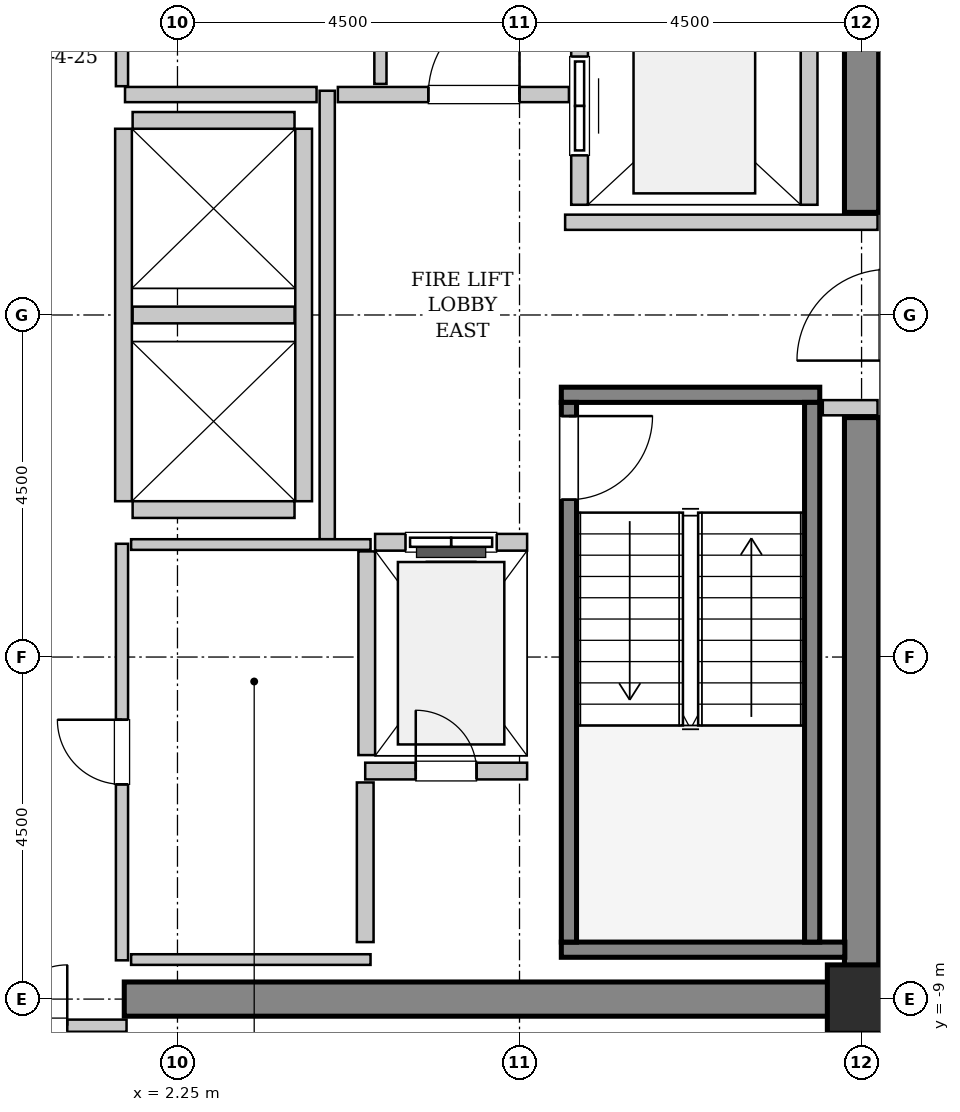
"""IFC4 building model, lengths in metres.
Left out: names, types, materials, properties, quantities, classifications, styles, units other than length and angle.
Written with IfcOpenShell. Run it as: python <this file> out.ifc"""

import sys

from ifc_helpers import new_model, si_unit, direction, frame, frame_2d, origin, origin_2d, place, context, subcontext, project, spatial, rectangle, extrude, source, transform, mapped, element, fill, save


model = new_model("IFC4")
c1 = context("Model", 3, precision=1e-05, world=origin(), true_north=direction((0.0, 1.0)))
c2 = subcontext(c1, "Body", "Model", "MODEL_VIEW")
j1 = project(units=[si_unit("LENGTHUNIT", "METRE"), si_unit("PLANEANGLEUNIT", "RADIAN")], contexts=[c1])
p1 = place(None, origin())
s1 = spatial("IfcSite", under=j1, at=p1, CompositionType="ELEMENT")
p2 = place(p1, origin())
s2 = spatial("IfcBuilding", under=s1, at=p2, CompositionType="ELEMENT")
p3 = place(p2, frame((0.0, 0.0, 302.6)))
s3 = spatial("IfcBuildingStorey", under=s2, at=p3, CompositionType="ELEMENT", Elevation=302.6)
m1 = source(origin(), c2, "Body", "SweptSolid", [
    extrude(rectangle(XDim=9.925, YDim=0.45, at=frame_2d((4.962, 0.0))), origin(), (0.0, 0.0, 1.0), 3.8),
])
p4 = place(p3, frame((1.55, -9.0, 0.0), z_axis=(0.0, 0.0, 1.0), x_axis=(1.0, 0.0, 0.0)))
e1 = element("IfcWall", 1, at=p4, inside=s3, PredefinedType="SHEAR", context=c2, shape_type="MappedRepresentation", body=[
    mapped(m1, transform((0.0, 0.0, 0.0), x_axis=(1.0, 0.0, 0.0), y_axis=(0.0, 1.0, 0.0), z_axis=(0.0, 0.0, 1.0), scale=1.0)),
])
m2 = source(origin(), c2, "Body", "SweptSolid", [
    extrude(rectangle(XDim=7.425, YDim=0.45, at=frame_2d((3.712, 0.0))), origin(), (0.0, 0.0, 1.0), 3.8),
])
for number, where, z_axis, x_axis in (
    (2, (11.25, -8.775, 0.0), (0.0, 0.0, 1.0), (0.0, 1.0, 0.0)),
    (3, (11.25, 1.35, 0.0), (0.0, 0.0, 1.0), (0.0, 1.0, 0.0)),
):
    element("IfcWall", number, at=place(p3, frame(where, z_axis=z_axis, x_axis=x_axis)), inside=s3, PredefinedType="SHEAR", context=c2, shape_type="MappedRepresentation", body=[
        mapped(m2, transform((0.0, 0.0, 0.0), x_axis=(1.0, 0.0, 0.0), y_axis=(0.0, 1.0, 0.0), z_axis=(0.0, 0.0, 1.0), scale=1.0)),
    ])
m3 = source(origin(), c2, "Body", "SweptSolid", [
    extrude(rectangle(XDim=0.9, YDim=0.9, at=origin_2d()), origin(), (0.0, 0.0, 1.0), 3.8),
])
p5 = place(p3, frame((11.25, -9.0, 0.0), z_axis=(0.0, 0.0, 1.0), x_axis=(1.0, 0.0, 0.0)))
e4 = element("IfcColumn", 4, at=p5, inside=s3, PredefinedType="COLUMN", context=c2, shape_type="MappedRepresentation", body=[
    mapped(m3, transform((0.0, 0.0, 0.0), x_axis=(1.0, 0.0, 0.0), y_axis=(0.0, 1.0, 0.0), z_axis=(0.0, 0.0, 1.0), scale=1.0)),
])
m4 = source(origin(), c2, "Body", "SweptSolid", [
    extrude(rectangle(XDim=3.4, YDim=0.2, at=frame_2d((1.7, 0.0))), origin(), (0.0, 0.0, 1.0), 3.8),
])
p6 = place(p3, frame((7.3, -1.05, 0.0), z_axis=(0.0, 0.0, 1.0), x_axis=(1.0, 0.0, 0.0)))
e5 = element("IfcWall", 5, at=p6, inside=s3, PredefinedType="SOLIDWALL", context=c2, shape_type="MappedRepresentation", body=[
    mapped(m4, transform((0.0, 0.0, 0.0), x_axis=(1.0, 0.0, 0.0), y_axis=(0.0, 1.0, 0.0), z_axis=(0.0, 0.0, 1.0), scale=1.0)),
])
m5 = source(origin(), c2, "Body", "SweptSolid", [
    extrude(rectangle(XDim=3.73, YDim=0.2, at=frame_2d((1.865, 0.0))), origin(), (0.0, 0.0, 1.0), 3.8),
])
p7 = place(p3, frame((7.3, -8.35, 0.0), z_axis=(0.0, 0.0, 1.0), x_axis=(1.0, 0.0, 0.0)))
e6 = element("IfcWall", 6, at=p7, inside=s3, PredefinedType="SOLIDWALL", context=c2, shape_type="MappedRepresentation", body=[
    mapped(m5, transform((0.0, 0.0, 0.0), x_axis=(1.0, 0.0, 0.0), y_axis=(0.0, 1.0, 0.0), z_axis=(0.0, 0.0, 1.0), scale=1.0)),
])
m6 = source(origin(), c2, "Body", "SweptSolid", [
    extrude(rectangle(XDim=7.1, YDim=0.2, at=frame_2d((3.55, 0.0))), origin(), (0.0, 0.0, 1.0), 3.8),
])
p8 = place(p3, frame((7.4, -1.15, 0.0), z_axis=(0.0, 0.0, 1.0), x_axis=(0.0, -1.0, 0.0)))
e7 = element("IfcWall", 7, at=p8, inside=s3, PredefinedType="SOLIDWALL", context=c2, shape_type="MappedRepresentation", body=[
    mapped(m6, transform((0.0, 0.0, 0.0), x_axis=(1.0, 0.0, 0.0), y_axis=(0.0, 1.0, 0.0), z_axis=(0.0, 0.0, 1.0), scale=1.0)),
])
p9 = place(p8, frame((0.18, 0.0, 0.0)))
e8 = element("IfcOpeningElement", 8, at=p9, cuts=e7, PredefinedType="OPENING", context=c2, shape_type="SweptSolid", body=[
    extrude(rectangle(XDim=1.1, YDim=2.15, at=frame_2d((0.55, 1.075))), frame((0.0, 0.11, 0.0), z_axis=(0.0, -1.0, 0.0), x_axis=(1.0, 0.0, 0.0)), (0.0, 0.0, 1.0), 0.22),
])
p10 = place(p3, frame((10.6, -1.15, 0.0), z_axis=(0.0, 0.0, 1.0), x_axis=(0.0, -1.0, 0.0)))
e9 = element("IfcWall", 9, at=p10, inside=s3, PredefinedType="SOLIDWALL", context=c2, shape_type="MappedRepresentation", body=[
    mapped(m6, transform((0.0, 0.0, 0.0), x_axis=(1.0, 0.0, 0.0), y_axis=(0.0, 1.0, 0.0), z_axis=(0.0, 0.0, 1.0), scale=1.0)),
])
m7 = source(origin(), c2, "Body", "SweptSolid", [
    extrude(rectangle(XDim=2.0, YDim=0.22, at=frame_2d((1.0, 0.0))), origin(), (0.0, 0.0, 1.0), 3.535),
])
p11 = place(p3, frame((6.85, -2.99, 0.0), z_axis=(0.0, 0.0, 1.0), x_axis=(-1.0, 0.0, 0.0)))
e10 = element("IfcWall", 10, at=p11, inside=s3, PredefinedType="SOLIDWALL", context=c2, shape_type="MappedRepresentation", body=[
    mapped(m7, transform((0.0, 0.0, 0.0), x_axis=(1.0, 0.0, 0.0), y_axis=(0.0, 1.0, 0.0), z_axis=(0.0, 0.0, 1.0), scale=1.0)),
])
p12 = place(p11, frame((0.4, 0.0, 0.0)))
e11 = element("IfcOpeningElement", 11, at=p12, cuts=e10, PredefinedType="OPENING", context=c2, shape_type="SweptSolid", body=[
    extrude(rectangle(XDim=1.2, YDim=2.2, at=frame_2d((0.6, 1.1))), frame((0.0, 0.12, 0.0), z_axis=(0.0, -1.0, 0.0), x_axis=(1.0, 0.0, 0.0)), (0.0, 0.0, 1.0), 0.24),
])
m8 = source(origin(), c2, "Body", "SweptSolid", [
    extrude(rectangle(XDim=2.68, YDim=0.22, at=frame_2d((1.34, 0.0))), origin(), (0.0, 0.0, 1.0), 3.535),
])
p13 = place(p3, frame((4.74, -3.11, 0.0), z_axis=(0.0, 0.0, 1.0), x_axis=(0.0, -1.0, 0.0)))
e12 = element("IfcWall", 12, at=p13, inside=s3, PredefinedType="SOLIDWALL", context=c2, shape_type="MappedRepresentation", body=[
    mapped(m8, transform((0.0, 0.0, 0.0), x_axis=(1.0, 0.0, 0.0), y_axis=(0.0, 1.0, 0.0), z_axis=(0.0, 0.0, 1.0), scale=1.0)),
])
m9 = source(origin(), c2, "Body", "SweptSolid", [
    extrude(rectangle(XDim=5.45, YDim=0.22, at=frame_2d((2.725, 0.0))), origin(), (0.0, 0.0, 1.0), 3.535),
])
p14 = place(p3, frame((7.54, 6.9, 0.0), z_axis=(0.0, 0.0, 1.0), x_axis=(0.0, -1.0, 0.0)))
e13 = element("IfcWall", 13, at=p14, inside=s3, PredefinedType="SOLIDWALL", context=c2, shape_type="MappedRepresentation", body=[
    mapped(m9, transform((0.0, 0.0, 0.0), x_axis=(1.0, 0.0, 0.0), y_axis=(0.0, 1.0, 0.0), z_axis=(0.0, 0.0, 1.0), scale=1.0)),
])
p15 = place(p14, frame((3.5, 0.0, 0.0)))
e14 = element("IfcOpeningElement", 14, at=p15, cuts=e13, PredefinedType="OPENING", context=c2, shape_type="SweptSolid", body=[
    extrude(rectangle(XDim=1.3, YDim=2.3, at=frame_2d((0.65, 1.15))), frame((0.0, 0.12, 0.0), z_axis=(0.0, -1.0, 0.0), x_axis=(1.0, 0.0, 0.0)), (0.0, 0.0, 1.0), 0.24),
])
p16 = place(p14, frame((0.65, 0.0, 0.0)))
e15 = element("IfcOpeningElement", 15, at=p16, cuts=e13, PredefinedType="OPENING", context=c2, shape_type="SweptSolid", body=[
    extrude(rectangle(XDim=1.3, YDim=2.3, at=frame_2d((0.65, 1.15))), frame((0.0, 0.12, 0.0), z_axis=(0.0, -1.0, 0.0), x_axis=(1.0, 0.0, 0.0)), (0.0, 0.0, 1.0), 0.24),
])
p17 = place(p3, frame((10.56, 1.45, 0.0), z_axis=(0.0, 0.0, 1.0), x_axis=(0.0, 1.0, 0.0)))
e16 = element("IfcWall", 16, at=p17, inside=s3, PredefinedType="SOLIDWALL", context=c2, shape_type="MappedRepresentation", body=[
    mapped(m9, transform((0.0, 0.0, 0.0), x_axis=(1.0, 0.0, 0.0), y_axis=(0.0, 1.0, 0.0), z_axis=(0.0, 0.0, 1.0), scale=1.0)),
])
m10 = source(origin(), c2, "Body", "SweptSolid", [
    extrude(rectangle(XDim=4.9, YDim=0.22, at=frame_2d((2.45, 0.0))), origin(), (0.0, 0.0, 1.0), 3.535),
])
for number, where, z_axis, x_axis in (
    (17, (1.54, 2.45, 0.0), (0.0, 0.0, 1.0), (0.0, -1.0, 0.0)),
    (18, (3.91, -2.45, 0.0), (0.0, 0.0, 1.0), (0.0, 1.0, 0.0)),
):
    element("IfcWall", number, at=place(p3, frame(where, z_axis=z_axis, x_axis=x_axis)), inside=s3, PredefinedType="SOLIDWALL", context=c2, shape_type="MappedRepresentation", body=[
        mapped(m10, transform((0.0, 0.0, 0.0), x_axis=(1.0, 0.0, 0.0), y_axis=(0.0, 1.0, 0.0), z_axis=(0.0, 0.0, 1.0), scale=1.0)),
    ])
m11 = source(origin(), c2, "Body", "SweptSolid", [
    extrude(rectangle(XDim=2.13, YDim=0.22, at=frame_2d((1.065, 0.0))), origin(), (0.0, 0.0, 1.0), 3.535),
])
for number, where, z_axis, x_axis in (
    (19, (1.66, -2.56, 0.0), (0.0, 0.0, 1.0), (1.0, 0.0, 0.0)),
    (20, (1.66, 0.0, 0.0), (0.0, 0.0, 1.0), (1.0, 0.0, 0.0)),
    (21, (3.79, 2.56, 0.0), (0.0, 0.0, 1.0), (-1.0, 0.0, 0.0)),
):
    element("IfcWall", number, at=place(p3, frame(where, z_axis=z_axis, x_axis=x_axis)), inside=s3, PredefinedType="SOLIDWALL", context=c2, shape_type="MappedRepresentation", body=[
        mapped(m11, transform((0.0, 0.0, 0.0), x_axis=(1.0, 0.0, 0.0), y_axis=(0.0, 1.0, 0.0), z_axis=(0.0, 0.0, 1.0), scale=1.0)),
    ])
p18 = place(p3, frame((4.72, -6.0, 0.0), z_axis=(0.0, 0.0, 1.0), x_axis=(1.0, 0.0, 0.0)))
e22 = element("IfcWall", 22, at=p18, inside=s3, PredefinedType="SOLIDWALL", context=c2, shape_type="MappedRepresentation", body=[
    mapped(m11, transform((0.0, 0.0, 0.0), x_axis=(1.0, 0.0, 0.0), y_axis=(0.0, 1.0, 0.0), z_axis=(0.0, 0.0, 1.0), scale=1.0)),
])
p19 = place(p18, frame((0.665, 0.0, 0.0)))
e23 = element("IfcOpeningElement", 23, at=p19, cuts=e22, PredefinedType="OPENING", context=c2, shape_type="SweptSolid", body=[
    extrude(rectangle(XDim=0.8, YDim=2.0, at=frame_2d((0.4, 1.0))), frame((0.0, 0.12, 0.0), z_axis=(0.0, -1.0, 0.0), x_axis=(1.0, 0.0, 0.0)), (0.0, 0.0, 1.0), 0.24),
])
m12 = source(origin(), c2, "Body", "SweptSolid", [
    extrude(rectangle(XDim=2.1, YDim=0.22, at=frame_2d((1.05, 0.0))), origin(), (0.0, 0.0, 1.0), 3.535),
])
p20 = place(p3, frame((4.72, -8.25, 0.0), z_axis=(0.0, 0.0, 1.0), x_axis=(0.0, 1.0, 0.0)))
e24 = element("IfcWall", 24, at=p20, inside=s3, PredefinedType="SOLIDWALL", context=c2, shape_type="MappedRepresentation", body=[
    mapped(m12, transform((0.0, 0.0, 0.0), x_axis=(1.0, 0.0, 0.0), y_axis=(0.0, 1.0, 0.0), z_axis=(0.0, 0.0, 1.0), scale=1.0)),
])
m13 = source(origin(), c2, "Body", "SweptSolid", [
    extrude(rectangle(XDim=5.9, YDim=0.2, at=frame_2d((2.95, 0.0))), origin(), (0.0, 0.0, 1.0), 3.535),
])
p21 = place(p3, frame((4.22, -2.95, 0.0), z_axis=(0.0, 0.0, 1.0), x_axis=(0.0, 1.0, 0.0)))
e25 = element("IfcWall", 25, at=p21, inside=s3, PredefinedType="PARTITIONING", context=c2, shape_type="MappedRepresentation", body=[
    mapped(m13, transform((0.0, 0.0, 0.0), x_axis=(1.0, 0.0, 0.0), y_axis=(0.0, 1.0, 0.0), z_axis=(0.0, 0.0, 1.0), scale=1.0)),
])
m14 = source(origin(), c2, "Body", "SweptSolid", [
    extrude(rectangle(XDim=2.52, YDim=0.2, at=frame_2d((1.26, 0.0))), origin(), (0.0, 0.0, 1.0), 3.535),
])
p22 = place(p3, frame((1.56, 2.9, 0.0), z_axis=(0.0, 0.0, 1.0), x_axis=(1.0, 0.0, 0.0)))
e26 = element("IfcWall", 26, at=p22, inside=s3, PredefinedType="PARTITIONING", context=c2, shape_type="MappedRepresentation", body=[
    mapped(m14, transform((0.0, 0.0, 0.0), x_axis=(1.0, 0.0, 0.0), y_axis=(0.0, 1.0, 0.0), z_axis=(0.0, 0.0, 1.0), scale=1.0)),
])
m15 = source(origin(), c2, "Body", "SweptSolid", [
    extrude(rectangle(XDim=3.04, YDim=0.2, at=frame_2d((1.52, 0.0))), origin(), (0.0, 0.0, 1.0), 3.535),
])
p23 = place(p3, frame((4.36, 2.9, 0.0), z_axis=(0.0, 0.0, 1.0), x_axis=(1.0, 0.0, 0.0)))
e27 = element("IfcWall", 27, at=p23, inside=s3, PredefinedType="PARTITIONING", context=c2, shape_type="MappedRepresentation", body=[
    mapped(m15, transform((0.0, 0.0, 0.0), x_axis=(1.0, 0.0, 0.0), y_axis=(0.0, 1.0, 0.0), z_axis=(0.0, 0.0, 1.0), scale=1.0)),
])
p24 = place(p23, frame((1.19, 0.0, 0.0)))
e28 = element("IfcOpeningElement", 28, at=p24, cuts=e27, PredefinedType="OPENING", context=c2, shape_type="SweptSolid", body=[
    extrude(rectangle(XDim=1.2, YDim=2.15, at=frame_2d((0.6, 1.075))), frame((0.0, 0.11, 0.0), z_axis=(0.0, -1.0, 0.0), x_axis=(1.0, 0.0, 0.0)), (0.0, 0.0, 1.0), 0.22),
])
m16 = source(origin(), c2, "Body", "SweptSolid", [
    extrude(rectangle(XDim=4.11, YDim=0.2, at=frame_2d((2.055, 0.0))), origin(), (0.0, 0.0, 1.0), 3.535),
])
p25 = place(p3, frame((7.35, 1.22, 0.0), z_axis=(0.0, 0.0, 1.0), x_axis=(1.0, 0.0, 0.0)))
e29 = element("IfcWall", 29, at=p25, inside=s3, PredefinedType="PARTITIONING", context=c2, shape_type="MappedRepresentation", body=[
    mapped(m16, transform((0.0, 0.0, 0.0), x_axis=(1.0, 0.0, 0.0), y_axis=(0.0, 1.0, 0.0), z_axis=(0.0, 0.0, 1.0), scale=1.0)),
])
m17 = source(origin(), c2, "Body", "SweptSolid", [
    extrude(rectangle(XDim=0.72, YDim=0.2, at=frame_2d((0.36, 0.0))), origin(), (0.0, 0.0, 1.0), 3.535),
])
p26 = place(p3, frame((10.74, -1.22, 0.0), z_axis=(0.0, 0.0, 1.0), x_axis=(1.0, 0.0, 0.0)))
e30 = element("IfcWall", 30, at=p26, inside=s3, PredefinedType="PARTITIONING", context=c2, shape_type="MappedRepresentation", body=[
    mapped(m17, transform((0.0, 0.0, 0.0), x_axis=(1.0, 0.0, 0.0), y_axis=(0.0, 1.0, 0.0), z_axis=(0.0, 0.0, 1.0), scale=1.0)),
])
m18 = source(origin(), c2, "Body", "SweptSolid", [
    extrude(rectangle(XDim=3.16, YDim=0.16, at=frame_2d((1.58, 0.0))), origin(), (0.0, 0.0, 1.0), 2.625),
])
p27 = place(p3, frame((-1.58, -9.35, 0.0), z_axis=(0.0, 0.0, 1.0), x_axis=(1.0, 0.0, 0.0)))
e31 = element("IfcWall", 31, at=p27, inside=s3, PredefinedType="PARTITIONING", context=c2, shape_type="MappedRepresentation", body=[
    mapped(m18, transform((0.0, 0.0, 0.0), x_axis=(1.0, 0.0, 0.0), y_axis=(0.0, 1.0, 0.0), z_axis=(0.0, 0.0, 1.0), scale=1.0)),
])
p28 = place(p27, frame((0.78, 0.0, 0.0)))
e32 = element("IfcOpeningElement", 32, at=p28, cuts=e31, PredefinedType="OPENING", context=c2, shape_type="SweptSolid", body=[
    extrude(rectangle(XDim=1.6, YDim=2.3, at=frame_2d((0.8, 1.15))), frame((0.0, 0.09, 0.0), z_axis=(0.0, -1.0, 0.0), x_axis=(1.0, 0.0, 0.0)), (0.0, 0.0, 1.0), 0.18),
])
m19 = source(origin(), c2, "Body", "SweptSolid", [
    extrude(rectangle(XDim=5.45, YDim=0.16, at=frame_2d((2.725, 0.0))), origin(), (0.0, 0.0, 1.0), 3.535),
])
p29 = place(p3, frame((4.92, 3.04, 0.0), z_axis=(0.0, 0.0, 1.0), x_axis=(0.0, 1.0, 0.0)))
e33 = element("IfcWall", 33, at=p29, inside=s3, PredefinedType="PARTITIONING", context=c2, shape_type="MappedRepresentation", body=[
    mapped(m19, transform((0.0, 0.0, 0.0), x_axis=(1.0, 0.0, 0.0), y_axis=(0.0, 1.0, 0.0), z_axis=(0.0, 0.0, 1.0), scale=1.0)),
])
m20 = source(origin(), c2, "Body", "SweptSolid", [
    extrude(rectangle(XDim=5.48, YDim=0.16, at=frame_2d((2.74, 0.0))), origin(), (0.0, 0.0, 1.0), 3.535),
])
p30 = place(p3, frame((1.52, 3.01, 0.0), z_axis=(0.0, 0.0, 1.0), x_axis=(0.0, 1.0, 0.0)))
e34 = element("IfcWall", 34, at=p30, inside=s3, PredefinedType="PARTITIONING", context=c2, shape_type="MappedRepresentation", body=[
    mapped(m20, transform((0.0, 0.0, 0.0), x_axis=(1.0, 0.0, 0.0), y_axis=(0.0, 1.0, 0.0), z_axis=(0.0, 0.0, 1.0), scale=1.0)),
])
p31 = place(p30, frame((2.315, 0.0, 0.0)))
e35 = element("IfcOpeningElement", 35, at=p31, cuts=e34, PredefinedType="OPENING", context=c2, shape_type="SweptSolid", body=[
    extrude(rectangle(XDim=0.85, YDim=2.1, at=frame_2d((0.425, 1.05))), frame((0.0, 0.09, 0.0), z_axis=(0.0, -1.0, 0.0), x_axis=(1.0, 0.0, 0.0)), (0.0, 0.0, 1.0), 0.18),
])
p32 = place(p3, frame((1.52, -8.49, 0.0), z_axis=(0.0, 0.0, 1.0), x_axis=(0.0, 1.0, 0.0)))
e36 = element("IfcWall", 36, at=p32, inside=s3, PredefinedType="PARTITIONING", context=c2, shape_type="MappedRepresentation", body=[
    mapped(m20, transform((0.0, 0.0, 0.0), x_axis=(1.0, 0.0, 0.0), y_axis=(0.0, 1.0, 0.0), z_axis=(0.0, 0.0, 1.0), scale=1.0)),
])
p33 = place(p32, frame((2.315, 0.0, 0.0)))
e37 = element("IfcOpeningElement", 37, at=p33, cuts=e36, PredefinedType="OPENING", context=c2, shape_type="SweptSolid", body=[
    extrude(rectangle(XDim=0.85, YDim=2.1, at=frame_2d((0.425, 1.05))), frame((0.0, 0.09, 0.0), z_axis=(0.0, -1.0, 0.0), x_axis=(1.0, 0.0, 0.0)), (0.0, 0.0, 1.0), 0.18),
])
m21 = source(origin(), c2, "Body", "SweptSolid", [
    extrude(rectangle(XDim=3.15, YDim=0.14, at=frame_2d((1.575, 0.0))), origin(), (0.0, 0.0, 1.0), 3.535),
])
for number, where, z_axis, x_axis in (
    (38, (1.64, -3.02, 0.0), (0.0, 0.0, 1.0), (1.0, 0.0, 0.0)),
    (39, (1.64, -8.48, 0.0), (0.0, 0.0, 1.0), (1.0, 0.0, 0.0)),
):
    element("IfcWall", number, at=place(p3, frame(where, z_axis=z_axis, x_axis=x_axis)), inside=s3, PredefinedType="PARTITIONING", context=c2, shape_type="MappedRepresentation", body=[
        mapped(m21, transform((0.0, 0.0, 0.0), x_axis=(1.0, 0.0, 0.0), y_axis=(0.0, 1.0, 0.0), z_axis=(0.0, 0.0, 1.0), scale=1.0)),
    ])
m22 = source(origin(), c2, "Body", "SweptSolid", [
    extrude(rectangle(XDim=1.1, YDim=2.15, at=frame_2d((0.55, 1.075))), frame((0.0, 0.025, 0.0), z_axis=(0.0, -1.0, 0.0), x_axis=(1.0, 0.0, 0.0)), (0.0, 0.0, 1.0), 0.05),
])
p34 = place(p9, origin())
e40 = element("IfcDoor", 40, at=p34, inside=s3, OperationType="SINGLE_SWING_LEFT", PredefinedType="DOOR", context=c2, shape_type="MappedRepresentation", body=[
    mapped(m22, transform((0.0, 0.0, 0.0), x_axis=(1.0, 0.0, 0.0), y_axis=(0.0, 1.0, 0.0), z_axis=(0.0, 0.0, 1.0), scale=1.0)),
])
fill(e8, e40)
m23 = source(origin(), c2, "Body", "SweptSolid", [
    extrude(rectangle(XDim=1.2, YDim=2.2, at=frame_2d((0.6, 1.1))), frame((0.0, 0.025, 0.0), z_axis=(0.0, -1.0, 0.0), x_axis=(1.0, 0.0, 0.0)), (0.0, 0.0, 1.0), 0.05),
])
p35 = place(p12, origin())
e41 = element("IfcDoor", 41, at=p35, inside=s3, OperationType="SLIDING_TO_LEFT", PredefinedType="DOOR", context=c2, shape_type="MappedRepresentation", body=[
    mapped(m23, transform((0.0, 0.0, 0.0), x_axis=(1.0, 0.0, 0.0), y_axis=(0.0, 1.0, 0.0), z_axis=(0.0, 0.0, 1.0), scale=1.0)),
])
fill(e11, e41)
m24 = source(origin(), c2, "Body", "SweptSolid", [
    extrude(rectangle(XDim=1.3, YDim=2.3, at=frame_2d((0.65, 1.15))), frame((0.0, 0.025, 0.0), z_axis=(0.0, -1.0, 0.0), x_axis=(1.0, 0.0, 0.0)), (0.0, 0.0, 1.0), 0.05),
])
p36 = place(p15, origin())
e42 = element("IfcDoor", 42, at=p36, inside=s3, OperationType="SLIDING_TO_RIGHT", PredefinedType="DOOR", context=c2, shape_type="MappedRepresentation", body=[
    mapped(m24, transform((0.0, 0.0, 0.0), x_axis=(1.0, 0.0, 0.0), y_axis=(0.0, 1.0, 0.0), z_axis=(0.0, 0.0, 1.0), scale=1.0)),
])
fill(e14, e42)
m25 = source(origin(), c2, "Body", "SweptSolid", [
    extrude(rectangle(XDim=0.8, YDim=2.0, at=frame_2d((0.4, 1.0))), frame((0.0, 0.025, 0.0), z_axis=(0.0, -1.0, 0.0), x_axis=(1.0, 0.0, 0.0)), (0.0, 0.0, 1.0), 0.05),
])
p37 = place(p19, origin())
e43 = element("IfcDoor", 43, at=p37, inside=s3, OperationType="SINGLE_SWING_LEFT", PredefinedType="TRAPDOOR", context=c2, shape_type="MappedRepresentation", body=[
    mapped(m25, transform((0.0, 0.0, 0.0), x_axis=(1.0, 0.0, 0.0), y_axis=(0.0, 1.0, 0.0), z_axis=(0.0, 0.0, 1.0), scale=1.0)),
])
fill(e23, e43)
m26 = source(origin(), c2, "Body", "SweptSolid", [
    extrude(rectangle(XDim=1.2, YDim=2.15, at=frame_2d((0.6, 1.075))), frame((0.0, 0.025, 0.0), z_axis=(0.0, -1.0, 0.0), x_axis=(1.0, 0.0, 0.0)), (0.0, 0.0, 1.0), 0.05),
])
p38 = place(p24, origin())
e44 = element("IfcDoor", 44, at=p38, inside=s3, OperationType="SINGLE_SWING_RIGHT", PredefinedType="DOOR", context=c2, shape_type="MappedRepresentation", body=[
    mapped(m26, transform((0.0, 0.0, 0.0), x_axis=(1.0, 0.0, 0.0), y_axis=(0.0, 1.0, 0.0), z_axis=(0.0, 0.0, 1.0), scale=1.0)),
])
fill(e28, e44)
m27 = source(origin(), c2, "Body", "SweptSolid", [
    extrude(rectangle(XDim=1.6, YDim=2.3, at=frame_2d((0.8, 1.15))), frame((0.0, 0.025, 0.0), z_axis=(0.0, -1.0, 0.0), x_axis=(1.0, 0.0, 0.0)), (0.0, 0.0, 1.0), 0.05),
])
p39 = place(p28, origin())
e45 = element("IfcDoor", 45, at=p39, inside=s3, OperationType="DOUBLE_DOOR_SINGLE_SWING", PredefinedType="DOOR", context=c2, shape_type="MappedRepresentation", body=[
    mapped(m27, transform((0.0, 0.0, 0.0), x_axis=(1.0, 0.0, 0.0), y_axis=(0.0, 1.0, 0.0), z_axis=(0.0, 0.0, 1.0), scale=1.0)),
])
fill(e32, e45)
m28 = source(origin(), c2, "Body", "SweptSolid", [
    extrude(rectangle(XDim=0.85, YDim=2.1, at=frame_2d((0.425, 1.05))), frame((0.0, 0.025, 0.0), z_axis=(0.0, -1.0, 0.0), x_axis=(1.0, 0.0, 0.0)), (0.0, 0.0, 1.0), 0.05),
])
p40 = place(p33, origin())
e46 = element("IfcDoor", 46, at=p40, inside=s3, OperationType="SINGLE_SWING_RIGHT", PredefinedType="DOOR", context=c2, shape_type="MappedRepresentation", body=[
    mapped(m28, transform((0.0, 0.0, 0.0), x_axis=(1.0, 0.0, 0.0), y_axis=(0.0, 1.0, 0.0), z_axis=(0.0, 0.0, 1.0), scale=1.0)),
])
fill(e37, e46)
save(model, sys.argv[1])
